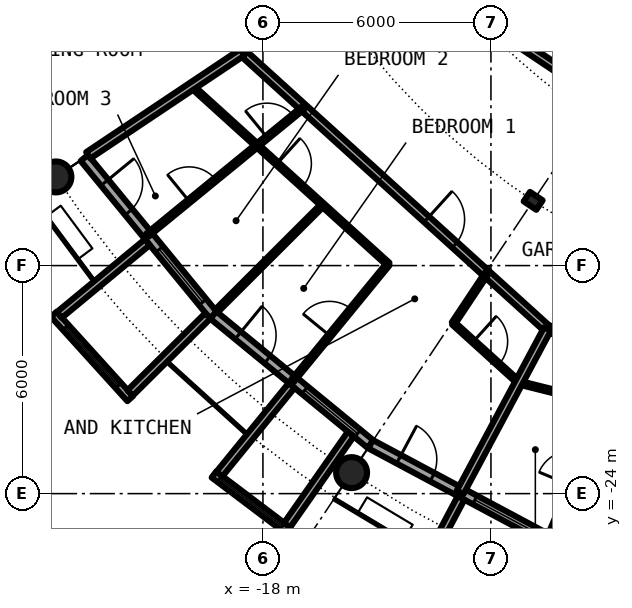
"""IFC4 building model, lengths in metres.
Left out: names, types, materials, properties, quantities, classifications, styles, units other than length and angle.
Written with IfcOpenShell. Run it as: python <this file> out.ifc"""

import sys

from ifc_helpers import new_model, si_unit, direction, frame, frame_2d, origin, origin_2d, place, context, subcontext, project, spatial, rectangle, circle, hollow_circle, i_section, extrude, element, fill, save


model = new_model("IFC4")
c1 = context("Model", 3, precision=1e-05, world=origin(), true_north=direction((0.0, 1.0)))
c2 = subcontext(c1, "Body", "Model", "MODEL_VIEW")
j1 = project(units=[si_unit("LENGTHUNIT", "METRE"), si_unit("PLANEANGLEUNIT", "RADIAN")], contexts=[c1])
p1 = place(None, origin())
s1 = spatial("IfcSite", under=j1, at=p1, CompositionType="ELEMENT")
p2 = place(p1, origin())
s2 = spatial("IfcBuilding", under=s1, at=p2, CompositionType="ELEMENT")
p3 = place(p2, frame((0.0, 0.0, 190.2)))
s3 = spatial("IfcBuildingStorey", under=s2, at=p3, CompositionType="ELEMENT", Elevation=190.2)
for number, where, z_axis, x_axis in (
    (1, (-23.448, -15.667, 0.0), (0.0, 0.0, 1.0), (1.0, 0.0, 0.0)),
    (2, (-15.667, -23.448, 0.0), (0.0, 0.0, 1.0), (1.0, 0.0, 0.0)),
):
    element("IfcColumn", number, at=place(p3, frame(where, z_axis=z_axis, x_axis=x_axis)), inside=s3, PredefinedType="COLUMN", context=c2, shape_type="SweptSolid", body=[
        extrude(hollow_circle(Radius=0.406, WallThickness=0.03, at=origin_2d()), origin(), (0.0, 0.0, 1.0), 3.05),
    ])
p4 = place(p3, frame((-10.889, -16.297, 0.0), z_axis=(0.0, 0.0, 1.0), x_axis=(-0.55557023302, -0.831469612303, 0.0)))
e3 = element("IfcColumn", 3, at=p4, inside=s3, PredefinedType="COLUMN", context=c2, shape_type="SweptSolid", body=[
    extrude(i_section(OverallWidth=0.3, OverallDepth=0.4, WebThickness=0.013, FlangeThickness=0.024, FilletRadius=0.027, at=origin_2d()), origin(), (0.0, 0.0, 1.0), 3.05),
])
p5 = place(p3, frame((-22.699, -15.167, 0.0), z_axis=(0.0, 0.0, 1.0), x_axis=(0.634382322723, -0.773019449054, 0.0)))
e4 = element("IfcWall", 4, at=p5, inside=s3, PredefinedType="SOLIDWALL", context=c2, shape_type="SweptSolid", body=[
    extrude(rectangle(XDim=5.352, YDim=0.25, at=frame_2d((2.676, 0.0))), origin(), (0.0, 0.0, 1.0), 2.7),
])
p6 = place(p5, frame((0.841, 0.0, 0.0)))
e5 = element("IfcOpeningElement", 5, at=p6, cuts=e4, PredefinedType="OPENING", context=c2, shape_type="SweptSolid", body=[
    extrude(rectangle(XDim=1.0, YDim=2.2, at=frame_2d((0.5, 1.1))), frame((0.0, 0.135, 0.0), z_axis=(0.0, -1.0, 0.0), x_axis=(1.0, 0.0, 0.0)), (0.0, 0.0, 1.0), 0.27),
])
p7 = place(p5, frame((3.111, 0.0, 0.3)))
e6 = element("IfcOpeningElement", 6, at=p7, cuts=e4, PredefinedType="OPENING", context=c2, shape_type="SweptSolid", body=[
    extrude(rectangle(XDim=1.8, YDim=2.1, at=frame_2d((0.9, 1.05))), frame((0.0, 0.135, 0.0), z_axis=(0.0, -1.0, 0.0), x_axis=(1.0, 0.0, 0.0)), (0.0, 0.0, 1.0), 0.27),
])
p8 = place(p3, frame((-23.503, -19.282, -0.03), z_axis=(0.0, 0.0, 1.0), x_axis=(0.671506829416, -0.740998365753, 0.0)))
e7 = element("IfcWall", 7, at=p8, inside=s3, PredefinedType="SOLIDWALL", context=c2, shape_type="SweptSolid", body=[
    extrude(rectangle(XDim=2.993, YDim=0.2, at=frame_2d((1.497, 0.0))), origin(), (0.0, 0.0, 1.0), 2.73),
])
p9 = place(p8, frame((0.457, 0.0, 0.33)))
e8 = element("IfcOpeningElement", 8, at=p9, cuts=e7, PredefinedType="OPENING", context=c2, shape_type="SweptSolid", body=[
    extrude(circle(Radius=1.04, at=frame_2d((1.04, 1.04))), frame((0.0, 0.11, 0.0), z_axis=(0.0, -1.0, 0.0), x_axis=(1.0, 0.0, 0.0)), (0.0, 0.0, 1.0), 0.22),
])
p10 = place(p3, frame((-21.041, -17.384, -0.03), z_axis=(0.0, 0.0, 1.0), x_axis=(-0.770784861449, -0.63709551667, 0.0)))
e9 = element("IfcWall", 9, at=p10, inside=s3, PredefinedType="SOLIDWALL", context=c2, shape_type="SweptSolid", body=[
    extrude(rectangle(XDim=3.006, YDim=0.2, at=frame_2d((1.503, 0.0))), origin(), (0.0, 0.0, 1.0), 2.73),
])
p11 = place(p3, frame((-19.45, -19.323, -0.03), z_axis=(0.0, 0.0, 1.0), x_axis=(-0.709727076896, -0.704476739375, 0.0)))
e10 = element("IfcWall", 10, at=p11, inside=s3, PredefinedType="SOLIDWALL", context=c2, shape_type="SweptSolid", body=[
    extrude(rectangle(XDim=2.883, YDim=0.2, at=frame_2d((1.441, 0.0))), origin(), (0.0, 0.0, 1.0), 2.73),
])
p12 = place(p3, frame((-19.304, -19.304, 0.0), z_axis=(0.0, 0.0, 1.0), x_axis=(0.773019449054, -0.634382322723, 0.0)))
e11 = element("IfcWall", 11, at=p12, inside=s3, PredefinedType="SOLIDWALL", context=c2, shape_type="SweptSolid", body=[
    extrude(rectangle(XDim=5.352, YDim=0.25, at=frame_2d((2.676, 0.0))), origin(), (0.0, 0.0, 1.0), 2.7),
])
p13 = place(p12, frame((0.841, 0.0, 0.0)))
e12 = element("IfcOpeningElement", 12, at=p13, cuts=e11, PredefinedType="OPENING", context=c2, shape_type="SweptSolid", body=[
    extrude(rectangle(XDim=1.0, YDim=2.2, at=frame_2d((0.5, 1.1))), frame((0.0, 0.135, 0.0), z_axis=(0.0, -1.0, 0.0), x_axis=(1.0, 0.0, 0.0)), (0.0, 0.0, 1.0), 0.27),
])
p14 = place(p12, frame((3.111, 0.0, 0.3)))
e13 = element("IfcOpeningElement", 13, at=p14, cuts=e11, PredefinedType="OPENING", context=c2, shape_type="SweptSolid", body=[
    extrude(rectangle(XDim=1.8, YDim=2.1, at=frame_2d((0.9, 1.05))), frame((0.0, 0.135, 0.0), z_axis=(0.0, -1.0, 0.0), x_axis=(1.0, 0.0, 0.0)), (0.0, 0.0, 1.0), 0.27),
])
p15 = place(p3, frame((-19.289, -23.497, -0.03), z_axis=(0.0, 0.0, 1.0), x_axis=(0.797887588059, -0.602806268067, 0.0)))
e14 = element("IfcWall", 14, at=p15, inside=s3, PredefinedType="SOLIDWALL", context=c2, shape_type="SweptSolid", body=[
    extrude(rectangle(XDim=2.447, YDim=0.2, at=frame_2d((1.223, 0.0))), origin(), (0.0, 0.0, 1.0), 2.73),
])
p16 = place(p15, frame((0.183, 0.0, 0.33)))
e15 = element("IfcOpeningElement", 15, at=p16, cuts=e14, PredefinedType="OPENING", context=c2, shape_type="SweptSolid", body=[
    extrude(circle(Radius=1.04, at=frame_2d((1.04, 1.04))), frame((0.0, 0.11, 0.0), z_axis=(0.0, -1.0, 0.0), x_axis=(1.0, 0.0, 0.0)), (0.0, 0.0, 1.0), 0.22),
])
p17 = place(p3, frame((-17.246, -21.155, -0.03), z_axis=(0.0, 0.0, 1.0), x_axis=(-0.631741648902, -0.775179004516, 0.0)))
e16 = element("IfcWall", 16, at=p17, inside=s3, PredefinedType="SOLIDWALL", context=c2, shape_type="SweptSolid", body=[
    extrude(rectangle(XDim=3.006, YDim=0.2, at=frame_2d((1.503, 0.0))), origin(), (0.0, 0.0, 1.0), 2.73),
])
p18 = place(p3, frame((-15.688, -22.433, -0.03), z_axis=(0.0, 0.0, 1.0), x_axis=(-0.573260687834, -0.819373043115, 0.0)))
e17 = element("IfcWall", 17, at=p18, inside=s3, PredefinedType="SOLIDWALL", context=c2, shape_type="SweptSolid", body=[
    extrude(rectangle(XDim=2.925, YDim=0.2, at=frame_2d((1.463, 0.0))), origin(), (0.0, 0.0, 1.0), 2.73),
])
p19 = place(p3, frame((-15.167, -22.699, 0.0), z_axis=(0.0, 0.0, 1.0), x_axis=(0.881915646801, -0.471407246368, 0.0)))
e18 = element("IfcWall", 18, at=p19, inside=s3, PredefinedType="SOLIDWALL", context=c2, shape_type="SweptSolid", body=[
    extrude(rectangle(XDim=5.352, YDim=0.25, at=frame_2d((2.676, 0.0))), origin(), (0.0, 0.0, 1.0), 2.7),
])
p20 = place(p19, frame((0.841, 0.0, 0.0)))
e19 = element("IfcOpeningElement", 19, at=p20, cuts=e18, PredefinedType="OPENING", context=c2, shape_type="SweptSolid", body=[
    extrude(rectangle(XDim=1.0, YDim=2.2, at=frame_2d((0.5, 1.1))), frame((0.0, 0.135, 0.0), z_axis=(0.0, -1.0, 0.0), x_axis=(1.0, 0.0, 0.0)), (0.0, 0.0, 1.0), 0.27),
])
p21 = place(p19, frame((3.111, 0.0, 0.3)))
e20 = element("IfcOpeningElement", 20, at=p21, cuts=e18, PredefinedType="OPENING", context=c2, shape_type="SweptSolid", body=[
    extrude(rectangle(XDim=1.8, YDim=2.1, at=frame_2d((0.9, 1.05))), frame((0.0, 0.135, 0.0), z_axis=(0.0, -1.0, 0.0), x_axis=(1.0, 0.0, 0.0)), (0.0, 0.0, 1.0), 0.27),
])
p22 = place(p3, frame((-12.787, -24.113, -0.03), z_axis=(0.0, 0.0, 1.0), x_axis=(-0.468365282436, -0.883534924159, 0.0)))
e21 = element("IfcWall", 21, at=p22, inside=s3, PredefinedType="SOLIDWALL", context=c2, shape_type="SweptSolid", body=[
    extrude(rectangle(XDim=3.006, YDim=0.2, at=frame_2d((1.503, 0.0))), origin(), (0.0, 0.0, 1.0), 2.73),
])
p23 = place(p3, frame((-19.869, -13.284, 0.0), z_axis=(0.0, 0.0, 1.0), x_axis=(0.741104058203, -0.67139018083, 0.0)))
e22 = element("IfcWall", 22, at=p23, inside=s3, PredefinedType="PARTITIONING", context=c2, shape_type="SweptSolid", body=[
    extrude(rectangle(XDim=6.969, YDim=0.1, at=frame_2d((3.484, 0.0))), origin(), (0.0, 0.0, 1.0), 2.7),
])
p24 = place(p23, frame((3.028, 0.0, 0.0)))
e23 = element("IfcOpeningElement", 23, at=p24, cuts=e22, PredefinedType="OPENING", context=c2, shape_type="SweptSolid", body=[
    extrude(rectangle(XDim=0.9, YDim=2.3, at=frame_2d((0.45, 1.15))), frame((0.0, 0.06, 0.0), z_axis=(0.0, -1.0, 0.0), x_axis=(1.0, 0.0, 0.0)), (0.0, 0.0, 1.0), 0.12),
])
p25 = place(p3, frame((-12.988, -19.518, 0.0), z_axis=(0.0, 0.0, 1.0), x_axis=(0.741132356378, -0.671358942988, 0.0)))
e24 = element("IfcWall", 24, at=p25, inside=s3, PredefinedType="PARTITIONING", context=c2, shape_type="SweptSolid", body=[
    extrude(rectangle(XDim=2.323, YDim=0.1, at=frame_2d((1.162, 0.0))), origin(), (0.0, 0.0, 1.0), 2.7),
])
p26 = place(p25, frame((0.712, 0.0, 0.0)))
e25 = element("IfcOpeningElement", 25, at=p26, cuts=e24, PredefinedType="OPENING", context=c2, shape_type="SweptSolid", body=[
    extrude(rectangle(XDim=0.9, YDim=2.3, at=frame_2d((0.45, 1.15))), frame((0.0, 0.06, 0.0), z_axis=(0.0, -1.0, 0.0), x_axis=(1.0, 0.0, 0.0)), (0.0, 0.0, 1.0), 0.12),
])
p27 = place(p3, frame((-11.266, -21.08, 0.0), z_axis=(0.0, 0.0, 1.0), x_axis=(0.970080680347, -0.24278277043, 0.0)))
e26 = element("IfcWall", 26, at=p27, inside=s3, PredefinedType="PARTITIONING", context=c2, shape_type="SweptSolid", body=[
    extrude(rectangle(XDim=6.973, YDim=0.1, at=frame_2d((3.486, 0.0))), origin(), (0.0, 0.0, 1.0), 2.7),
])
p28 = place(p27, frame((3.036, 0.0, 0.0)))
e27 = element("IfcOpeningElement", 27, at=p28, cuts=e26, PredefinedType="OPENING", context=c2, shape_type="SweptSolid", body=[
    extrude(rectangle(XDim=0.9, YDim=2.3, at=frame_2d((0.45, 1.15))), frame((0.0, 0.06, 0.0), z_axis=(0.0, -1.0, 0.0), x_axis=(1.0, 0.0, 0.0)), (0.0, 0.0, 1.0), 0.12),
])
p29 = place(p3, frame((-19.317, -10.915, 0.0), z_axis=(0.0, 0.0, 1.0), x_axis=(0.465359652486, -0.885121683068, 0.0)))
e28 = element("IfcWall", 28, at=p29, inside=s3, PredefinedType="PARTITIONING", context=c2, shape_type="SweptSolid", body=[
    extrude(rectangle(XDim=1.665, YDim=0.2, at=frame_2d((0.833, 0.0))), origin(), (0.0, 0.0, 1.0), 2.7),
])
p30 = place(p3, frame((-18.542, -12.389, 0.0), z_axis=(0.0, 0.0, 1.0), x_axis=(0.74093897184, -0.671572363941, 0.0)))
e29 = element("IfcWall", 29, at=p30, inside=s3, PredefinedType="PARTITIONING", context=c2, shape_type="SweptSolid", body=[
    extrude(rectangle(XDim=10.84, YDim=0.2, at=frame_2d((5.42, 0.0))), origin(), (0.0, 0.0, 1.0), 2.7),
])
p31 = place(p30, frame((6.544, 0.0, 0.0)))
e30 = element("IfcOpeningElement", 30, at=p31, cuts=e29, PredefinedType="OPENING", context=c2, shape_type="SweptSolid", body=[
    extrude(rectangle(XDim=1.0, YDim=2.3, at=frame_2d((0.5, 1.15))), frame((0.0, 0.11, 0.0), z_axis=(0.0, -1.0, 0.0), x_axis=(1.0, 0.0, 0.0)), (0.0, 0.0, 1.0), 0.22),
])
p32 = place(p3, frame((-10.517, -19.665, 0.0), z_axis=(0.0, 0.0, 1.0), x_axis=(0.970023226325, -0.243012222716, 0.0)))
e31 = element("IfcWall", 31, at=p32, inside=s3, PredefinedType="PARTITIONING", context=c2, shape_type="SweptSolid", body=[
    extrude(rectangle(XDim=10.847, YDim=0.2, at=frame_2d((5.424, 0.0))), origin(), (0.0, 0.0, 1.0), 2.7),
])
p33 = place(p32, frame((4.924, 0.0, 0.0)))
e32 = element("IfcOpeningElement", 32, at=p33, cuts=e31, PredefinedType="OPENING", context=c2, shape_type="SweptSolid", body=[
    extrude(rectangle(XDim=1.0, YDim=2.3, at=frame_2d((0.5, 1.15))), frame((0.0, 0.11, 0.0), z_axis=(0.0, -1.0, 0.0), x_axis=(1.0, 0.0, 0.0)), (0.0, 0.0, 1.0), 0.22),
])
p34 = place(p3, frame((-14.717, -9.834, 0.0), z_axis=(0.0, 0.0, 1.0), x_axis=(0.831492679744, -0.555535708603, 0.0)))
e33 = element("IfcWall", 33, at=p34, inside=s3, PredefinedType="PARTITIONING", context=c2, shape_type="SweptSolid", body=[
    extrude(rectangle(XDim=13.549, YDim=0.2, at=frame_2d((6.775, 0.0))), origin(), (0.0, 0.0, 1.0), 2.7),
])
p35 = place(p34, frame((7.966, 0.0, 0.0)))
e34 = element("IfcOpeningElement", 34, at=p35, cuts=e33, PredefinedType="OPENING", context=c2, shape_type="SweptSolid", body=[
    extrude(rectangle(XDim=1.0, YDim=2.3, at=frame_2d((0.5, 1.15))), frame((0.0, 0.11, 0.0), z_axis=(0.0, -1.0, 0.0), x_axis=(1.0, 0.0, 0.0)), (0.0, 0.0, 1.0), 0.22),
])
p36 = place(p3, frame((-22.595, -15.098, 0.0), z_axis=(0.0, 0.0, 1.0), x_axis=(0.831387096605, 0.55569370664, 0.0)))
e35 = element("IfcWall", 35, at=p36, inside=s3, PredefinedType="PARTITIONING", context=c2, shape_type="SweptSolid", body=[
    extrude(rectangle(XDim=4.875, YDim=0.2, at=frame_2d((2.438, 0.0))), origin(), (0.0, 0.0, 1.0), 2.7),
])
p37 = place(p3, frame((-21.04, -17.199, 0.0), z_axis=(0.0, 0.0, 1.0), x_axis=(0.774310172558, 0.632806255241, 0.0)))
e36 = element("IfcWall", 36, at=p37, inside=s3, PredefinedType="PARTITIONING", context=c2, shape_type="SweptSolid", body=[
    extrude(rectangle(XDim=5.3, YDim=0.1, at=frame_2d((2.65, 0.0))), origin(), (0.0, 0.0, 1.0), 2.7),
])
p38 = place(p37, frame((4.066, 0.0, 0.0)))
e37 = element("IfcOpeningElement", 37, at=p38, cuts=e36, PredefinedType="OPENING", context=c2, shape_type="SweptSolid", body=[
    extrude(rectangle(XDim=0.9, YDim=2.3, at=frame_2d((0.45, 1.15))), frame((0.0, 0.06, 0.0), z_axis=(0.0, -1.0, 0.0), x_axis=(1.0, 0.0, 0.0)), (0.0, 0.0, 1.0), 0.12),
])
p39 = place(p37, frame((1.416, 0.0, 0.0)))
e38 = element("IfcOpeningElement", 38, at=p39, cuts=e36, PredefinedType="OPENING", context=c2, shape_type="SweptSolid", body=[
    extrude(rectangle(XDim=0.9, YDim=2.3, at=frame_2d((0.45, 1.15))), frame((0.0, 0.06, 0.0), z_axis=(0.0, -1.0, 0.0), x_axis=(1.0, 0.0, 0.0)), (0.0, 0.0, 1.0), 0.12),
])
p40 = place(p3, frame((-19.231, -19.2, 0.0), z_axis=(0.0, 0.0, 1.0), x_axis=(0.707722727509, 0.706490297858, 0.0)))
e39 = element("IfcWall", 39, at=p40, inside=s3, PredefinedType="PARTITIONING", context=c2, shape_type="SweptSolid", body=[
    extrude(rectangle(XDim=3.962, YDim=0.1, at=frame_2d((1.981, 0.0))), origin(), (0.0, 0.0, 1.0), 2.7),
])
p41 = place(p3, frame((-17.216, -21.026, 0.0), z_axis=(0.0, 0.0, 1.0), x_axis=(0.633590098448, 0.773668913133, 0.0)))
e40 = element("IfcWall", 40, at=p41, inside=s3, PredefinedType="PARTITIONING", context=c2, shape_type="SweptSolid", body=[
    extrude(rectangle(XDim=3.962, YDim=0.1, at=frame_2d((1.981, 0.0))), origin(), (0.0, 0.0, 1.0), 2.7),
])
p42 = place(p41, frame((1.531, 0.0, 0.0)))
e41 = element("IfcOpeningElement", 41, at=p42, cuts=e40, PredefinedType="OPENING", context=c2, shape_type="SweptSolid", body=[
    extrude(rectangle(XDim=0.9, YDim=2.3, at=frame_2d((0.45, 1.15))), frame((0.0, 0.06, 0.0), z_axis=(0.0, -1.0, 0.0), x_axis=(1.0, 0.0, 0.0)), (0.0, 0.0, 1.0), 0.12),
])
p43 = place(p3, frame((-12.988, -19.518, 0.0), z_axis=(0.0, 0.0, 1.0), x_axis=(0.554125989098, 0.832432813028, 0.0)))
e42 = element("IfcWall", 42, at=p43, inside=s3, PredefinedType="PARTITIONING", context=c2, shape_type="SweptSolid", body=[
    extrude(rectangle(XDim=1.57, YDim=0.1, at=frame_2d((0.785, 0.0))), origin(), (0.0, 0.0, 1.0), 2.7),
])
p44 = place(p3, frame((-12.81, -23.966, 0.0), z_axis=(0.0, 0.0, 1.0), x_axis=(0.471427642527, 0.881904744211, 0.0)))
e43 = element("IfcWall", 43, at=p44, inside=s3, PredefinedType="PARTITIONING", context=c2, shape_type="SweptSolid", body=[
    extrude(rectangle(XDim=4.875, YDim=0.2, at=frame_2d((2.438, 0.0))), origin(), (0.0, 0.0, 1.0), 2.7),
])
p45 = place(p3, frame((-10.447, -25.086, 0.0), z_axis=(0.0, 0.0, 1.0), x_axis=(0.384363513821, 0.923181828917, 0.0)))
e44 = element("IfcWall", 44, at=p45, inside=s3, PredefinedType="PARTITIONING", context=c2, shape_type="SweptSolid", body=[
    extrude(rectangle(XDim=5.3, YDim=0.1, at=frame_2d((2.65, 0.0))), origin(), (0.0, 0.0, 1.0), 2.7),
])
p46 = place(p45, frame((4.065, 0.0, 0.0)))
e45 = element("IfcOpeningElement", 45, at=p46, cuts=e44, PredefinedType="OPENING", context=c2, shape_type="SweptSolid", body=[
    extrude(rectangle(XDim=0.9, YDim=2.3, at=frame_2d((0.45, 1.15))), frame((0.0, 0.06, 0.0), z_axis=(0.0, -1.0, 0.0), x_axis=(1.0, 0.0, 0.0)), (0.0, 0.0, 1.0), 0.12),
])
p47 = place(p45, frame((1.415, 0.0, 0.0)))
e46 = element("IfcOpeningElement", 46, at=p47, cuts=e44, PredefinedType="OPENING", context=c2, shape_type="SweptSolid", body=[
    extrude(rectangle(XDim=0.9, YDim=2.3, at=frame_2d((0.45, 1.15))), frame((0.0, 0.06, 0.0), z_axis=(0.0, -1.0, 0.0), x_axis=(1.0, 0.0, 0.0)), (0.0, 0.0, 1.0), 0.12),
])
p48 = place(p6, origin())
e47 = element("IfcDoor", 47, at=p48, inside=s3, OperationType="SINGLE_SWING_LEFT", PredefinedType="DOOR", context=c2, shape_type="SweptSolid", body=[
    extrude(rectangle(XDim=1.0, YDim=2.2, at=frame_2d((0.5, 1.1))), frame((0.0, 0.025, 0.0), z_axis=(0.0, -1.0, 0.0), x_axis=(1.0, 0.0, 0.0)), (0.0, 0.0, 1.0), 0.05),
])
fill(e5, e47)
p49 = place(p7, origin())
e48 = element("IfcWindow", 48, at=p49, inside=s3, PartitioningType="SINGLE_PANEL", PredefinedType="WINDOW", context=c2, shape_type="SweptSolid", body=[
    extrude(rectangle(XDim=1.8, YDim=2.1, at=frame_2d((0.9, 1.05))), frame((0.0, 0.03, 0.0), z_axis=(0.0, -1.0, 0.0), x_axis=(1.0, 0.0, 0.0)), (0.0, 0.0, 1.0), 0.06),
])
fill(e6, e48)
p50 = place(p9, origin())
e49 = element("IfcWindow", 49, at=p50, inside=s3, PartitioningType="SINGLE_PANEL", PredefinedType="WINDOW", context=c2, shape_type="SweptSolid", body=[
    extrude(circle(Radius=1.04, at=frame_2d((1.04, 1.04))), frame((0.0, 0.03, 0.0), z_axis=(0.0, -1.0, 0.0), x_axis=(1.0, 0.0, 0.0)), (0.0, 0.0, 1.0), 0.06),
])
fill(e8, e49)
p51 = place(p13, origin())
e50 = element("IfcDoor", 50, at=p51, inside=s3, OperationType="SINGLE_SWING_LEFT", PredefinedType="DOOR", context=c2, shape_type="SweptSolid", body=[
    extrude(rectangle(XDim=1.0, YDim=2.2, at=frame_2d((0.5, 1.1))), frame((0.0, 0.025, 0.0), z_axis=(0.0, -1.0, 0.0), x_axis=(1.0, 0.0, 0.0)), (0.0, 0.0, 1.0), 0.05),
])
fill(e12, e50)
p52 = place(p14, origin())
e51 = element("IfcWindow", 51, at=p52, inside=s3, PartitioningType="SINGLE_PANEL", PredefinedType="WINDOW", context=c2, shape_type="SweptSolid", body=[
    extrude(rectangle(XDim=1.8, YDim=2.1, at=frame_2d((0.9, 1.05))), frame((0.0, 0.03, 0.0), z_axis=(0.0, -1.0, 0.0), x_axis=(1.0, 0.0, 0.0)), (0.0, 0.0, 1.0), 0.06),
])
fill(e13, e51)
p53 = place(p16, origin())
e52 = element("IfcWindow", 52, at=p53, inside=s3, PartitioningType="SINGLE_PANEL", PredefinedType="WINDOW", context=c2, shape_type="SweptSolid", body=[
    extrude(circle(Radius=1.04, at=frame_2d((1.04, 1.04))), frame((0.0, 0.03, 0.0), z_axis=(0.0, -1.0, 0.0), x_axis=(1.0, 0.0, 0.0)), (0.0, 0.0, 1.0), 0.06),
])
fill(e15, e52)
p54 = place(p20, origin())
e53 = element("IfcDoor", 53, at=p54, inside=s3, OperationType="SINGLE_SWING_LEFT", PredefinedType="DOOR", context=c2, shape_type="SweptSolid", body=[
    extrude(rectangle(XDim=1.0, YDim=2.2, at=frame_2d((0.5, 1.1))), frame((0.0, 0.025, 0.0), z_axis=(0.0, -1.0, 0.0), x_axis=(1.0, 0.0, 0.0)), (0.0, 0.0, 1.0), 0.05),
])
fill(e19, e53)
p55 = place(p21, origin())
e54 = element("IfcWindow", 54, at=p55, inside=s3, PartitioningType="SINGLE_PANEL", PredefinedType="WINDOW", context=c2, shape_type="SweptSolid", body=[
    extrude(rectangle(XDim=1.8, YDim=2.1, at=frame_2d((0.9, 1.05))), frame((0.0, 0.03, 0.0), z_axis=(0.0, -1.0, 0.0), x_axis=(1.0, 0.0, 0.0)), (0.0, 0.0, 1.0), 0.06),
])
fill(e20, e54)
p56 = place(p31, origin())
e55 = element("IfcDoor", 55, at=p56, inside=s3, OperationType="SINGLE_SWING_RIGHT", PredefinedType="DOOR", context=c2, shape_type="SweptSolid", body=[
    extrude(rectangle(XDim=1.0, YDim=2.3, at=frame_2d((0.5, 1.15))), frame((0.0, 0.025, 0.0), z_axis=(0.0, -1.0, 0.0), x_axis=(1.0, 0.0, 0.0)), (0.0, 0.0, 1.0), 0.05),
])
fill(e30, e55)
p57 = place(p26, origin())
e56 = element("IfcDoor", 56, at=p57, inside=s3, OperationType="SINGLE_SWING_RIGHT", PredefinedType="DOOR", context=c2, shape_type="SweptSolid", body=[
    extrude(rectangle(XDim=0.9, YDim=2.3, at=frame_2d((0.45, 1.15))), frame((0.0, 0.025, 0.0), z_axis=(0.0, -1.0, 0.0), x_axis=(1.0, 0.0, 0.0)), (0.0, 0.0, 1.0), 0.05),
])
fill(e25, e56)
p58 = place(p38, origin())
e57 = element("IfcDoor", 57, at=p58, inside=s3, OperationType="SINGLE_SWING_RIGHT", PredefinedType="DOOR", context=c2, shape_type="SweptSolid", body=[
    extrude(rectangle(XDim=0.9, YDim=2.3, at=frame_2d((0.45, 1.15))), frame((0.0, 0.025, 0.0), z_axis=(0.0, -1.0, 0.0), x_axis=(1.0, 0.0, 0.0)), (0.0, 0.0, 1.0), 0.05),
])
fill(e37, e57)
p59 = place(p42, origin())
e58 = element("IfcDoor", 58, at=p59, inside=s3, OperationType="SINGLE_SWING_RIGHT", PredefinedType="DOOR", context=c2, shape_type="SweptSolid", body=[
    extrude(rectangle(XDim=0.9, YDim=2.3, at=frame_2d((0.45, 1.15))), frame((0.0, 0.025, 0.0), z_axis=(0.0, -1.0, 0.0), x_axis=(1.0, 0.0, 0.0)), (0.0, 0.0, 1.0), 0.05),
])
fill(e41, e58)
p60 = place(p24, origin())
e59 = element("IfcDoor", 59, at=p60, inside=s3, OperationType="SINGLE_SWING_LEFT", PredefinedType="DOOR", context=c2, shape_type="SweptSolid", body=[
    extrude(rectangle(XDim=0.9, YDim=2.3, at=frame_2d((0.45, 1.15))), frame((0.0, 0.025, 0.0), z_axis=(0.0, -1.0, 0.0), x_axis=(1.0, 0.0, 0.0)), (0.0, 0.0, 1.0), 0.05),
])
fill(e23, e59)
p61 = place(p39, origin())
e60 = element("IfcDoor", 60, at=p61, inside=s3, OperationType="SINGLE_SWING_LEFT", PredefinedType="DOOR", context=c2, shape_type="SweptSolid", body=[
    extrude(rectangle(XDim=0.9, YDim=2.3, at=frame_2d((0.45, 1.15))), frame((0.0, 0.025, 0.0), z_axis=(0.0, -1.0, 0.0), x_axis=(1.0, 0.0, 0.0)), (0.0, 0.0, 1.0), 0.05),
])
fill(e38, e60)
save(model, sys.argv[1])
